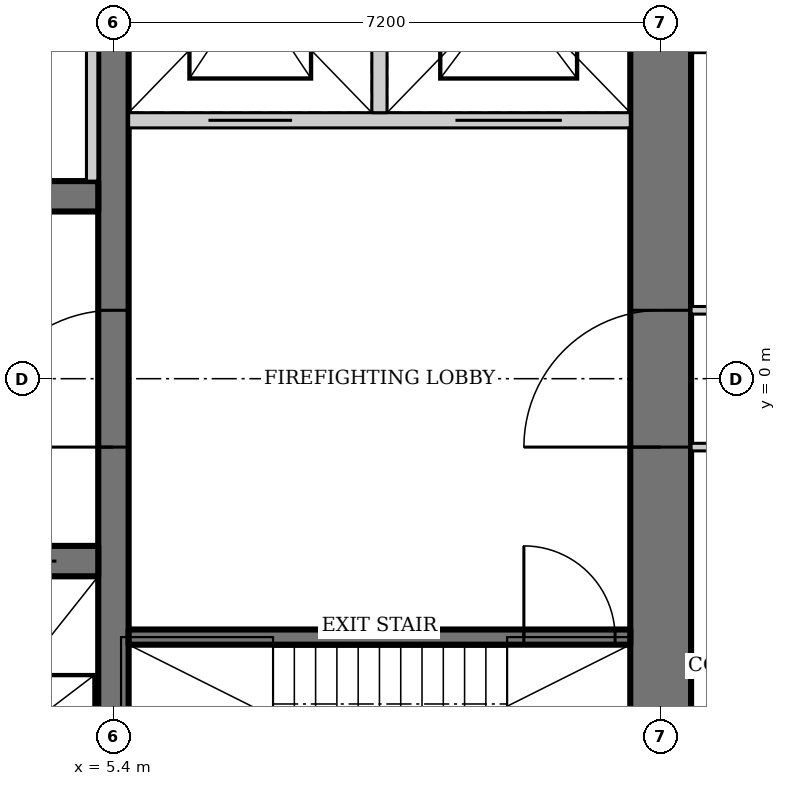
"""IFC4 building model, lengths in metres.
Left out: names, types, materials, properties, quantities, classifications, styles, units other than length and angle.
Written with IfcOpenShell. Run it as: python <this file> out.ifc"""

import sys

from ifc_helpers import new_model, si_unit, direction, frame, frame_2d, origin, place, context, subcontext, project, spatial, rectangle, extrude, element, fill, save


model = new_model("IFC4")
c1 = context("Model", 3, precision=1e-05, world=origin(), true_north=direction((0.0, 1.0)))
c2 = subcontext(c1, "Body", "Model", "MODEL_VIEW")
j1 = project(units=[si_unit("LENGTHUNIT", "METRE"), si_unit("PLANEANGLEUNIT", "RADIAN")], contexts=[c1])
p1 = place(None, origin())
s1 = spatial("IfcSite", under=j1, at=p1, CompositionType="ELEMENT")
p2 = place(p1, origin())
s2 = spatial("IfcBuilding", under=s1, at=p2, CompositionType="ELEMENT")
p3 = place(p2, frame((0.0, 0.0, 253.6)))
s3 = spatial("IfcBuildingStorey", under=s2, at=p3, CompositionType="ELEMENT", Elevation=253.6)
p4 = place(p3, frame((12.6, -11.0, 0.0), z_axis=(0.0, 0.0, 1.0), x_axis=(0.0, 1.0, 0.0)))
e1 = element("IfcWall", 1, at=p4, inside=s3, PredefinedType="SHEAR", context=c2, shape_type="SweptSolid", body=[
    extrude(rectangle(XDim=22.0, YDim=0.8, at=frame_2d((11.0, 0.0))), origin(), (0.0, 0.0, 1.0), 4.2),
])
p5 = place(p4, frame((10.1, 0.0, 0.0)))
e2 = element("IfcOpeningElement", 2, at=p5, cuts=e1, PredefinedType="OPENING", context=c2, shape_type="SweptSolid", body=[
    extrude(rectangle(XDim=1.8, YDim=2.1, at=frame_2d((0.9, 1.05))), frame((0.0, 0.41, 0.0), z_axis=(0.0, -1.0, 0.0), x_axis=(1.0, 0.0, 0.0)), (0.0, 0.0, 1.0), 0.82),
])
p6 = place(p3, frame((5.4, -6.8, 0.0), z_axis=(0.0, 0.0, 1.0), x_axis=(0.0, 1.0, 0.0)))
e3 = element("IfcWall", 3, at=p6, inside=s3, PredefinedType="SHEAR", context=c2, shape_type="SweptSolid", body=[
    extrude(rectangle(XDim=14.6, YDim=0.4, at=frame_2d((7.3, 0.0))), origin(), (0.0, 0.0, 1.0), 4.2),
])
p7 = place(p6, frame((5.9, 0.0, 0.0)))
e4 = element("IfcOpeningElement", 4, at=p7, cuts=e3, PredefinedType="OPENING", context=c2, shape_type="SweptSolid", body=[
    extrude(rectangle(XDim=1.8, YDim=2.1, at=frame_2d((0.9, 1.05))), frame((0.0, 0.21, 0.0), z_axis=(0.0, -1.0, 0.0), x_axis=(1.0, 0.0, 0.0)), (0.0, 0.0, 1.0), 0.42),
])
p8 = place(p3, frame((-5.2, -2.4, 0.0), z_axis=(0.0, 0.0, 1.0), x_axis=(1.0, 0.0, 0.0)))
e5 = element("IfcWall", 5, at=p8, inside=s3, PredefinedType="SHEAR", context=c2, shape_type="SweptSolid", body=[
    extrude(rectangle(XDim=10.4, YDim=0.4, at=frame_2d((5.2, 0.0))), origin(), (0.0, 0.0, 1.0), 4.2),
])
p9 = place(p8, frame((1.683, 0.0, 0.0)))
e6 = element("IfcOpeningElement", 6, at=p9, cuts=e5, PredefinedType="OPENING", context=c2, shape_type="SweptSolid", body=[
    extrude(rectangle(XDim=1.1, YDim=2.2, at=frame_2d((0.55, 1.1))), frame((0.0, 0.21, 0.0), z_axis=(0.0, -1.0, 0.0), x_axis=(1.0, 0.0, 0.0)), (0.0, 0.0, 1.0), 0.42),
])
p10 = place(p8, frame((5.217, 0.0, 0.0)))
e7 = element("IfcOpeningElement", 7, at=p10, cuts=e5, PredefinedType="OPENING", context=c2, shape_type="SweptSolid", body=[
    extrude(rectangle(XDim=1.1, YDim=2.2, at=frame_2d((0.55, 1.1))), frame((0.0, 0.21, 0.0), z_axis=(0.0, -1.0, 0.0), x_axis=(1.0, 0.0, 0.0)), (0.0, 0.0, 1.0), 0.42),
])
p11 = place(p8, frame((8.75, 0.0, 0.0)))
e8 = element("IfcOpeningElement", 8, at=p11, cuts=e5, PredefinedType="OPENING", context=c2, shape_type="SweptSolid", body=[
    extrude(rectangle(XDim=1.1, YDim=2.2, at=frame_2d((0.55, 1.1))), frame((0.0, 0.21, 0.0), z_axis=(0.0, -1.0, 0.0), x_axis=(1.0, 0.0, 0.0)), (0.0, 0.0, 1.0), 0.42),
])
p12 = place(p3, frame((5.2, 2.4, 0.0), z_axis=(0.0, 0.0, 1.0), x_axis=(-1.0, 0.0, 0.0)))
e9 = element("IfcWall", 9, at=p12, inside=s3, PredefinedType="SHEAR", context=c2, shape_type="SweptSolid", body=[
    extrude(rectangle(XDim=10.4, YDim=0.4, at=frame_2d((5.2, 0.0))), origin(), (0.0, 0.0, 1.0), 4.2),
])
p13 = place(p3, frame((5.6, -3.4, 0.0), z_axis=(0.0, 0.0, 1.0), x_axis=(1.0, 0.0, 0.0)))
e10 = element("IfcWall", 10, at=p13, inside=s3, PredefinedType="SHEAR", context=c2, shape_type="SweptSolid", body=[
    extrude(rectangle(XDim=6.6, YDim=0.2, at=frame_2d((3.3, 0.0))), origin(), (0.0, 0.0, 1.0), 4.2),
])
p14 = place(p13, frame((5.2, 0.0, 0.0)))
e11 = element("IfcOpeningElement", 11, at=p14, cuts=e10, PredefinedType="OPENING", context=c2, shape_type="SweptSolid", body=[
    extrude(rectangle(XDim=1.2, YDim=2.1, at=frame_2d((0.6, 1.05))), frame((0.0, 0.11, 0.0), z_axis=(0.0, -1.0, 0.0), x_axis=(1.0, 0.0, 0.0)), (0.0, 0.0, 1.0), 0.22),
])
p15 = place(p3, frame((12.2, 3.4, 0.0), z_axis=(0.0, 0.0, 1.0), x_axis=(-1.0, 0.0, 0.0)))
e12 = element("IfcWall", 12, at=p15, inside=s3, PredefinedType="SOLIDWALL", context=c2, shape_type="SweptSolid", body=[
    extrude(rectangle(XDim=6.6, YDim=0.2, at=frame_2d((3.3, 0.0))), origin(), (0.0, 0.0, 1.0), 4.2),
])
p16 = place(p15, frame((4.45, 0.0, 0.0)))
e13 = element("IfcOpeningElement", 13, at=p16, cuts=e12, PredefinedType="OPENING", context=c2, shape_type="SweptSolid", body=[
    extrude(rectangle(XDim=1.1, YDim=2.2, at=frame_2d((0.55, 1.1))), frame((0.0, 0.11, 0.0), z_axis=(0.0, -1.0, 0.0), x_axis=(1.0, 0.0, 0.0)), (0.0, 0.0, 1.0), 0.22),
])
p17 = place(p15, frame((0.9, 0.0, 0.0)))
e14 = element("IfcOpeningElement", 14, at=p17, cuts=e12, PredefinedType="OPENING", context=c2, shape_type="SweptSolid", body=[
    extrude(rectangle(XDim=1.4, YDim=2.2, at=frame_2d((0.7, 1.1))), frame((0.0, 0.11, 0.0), z_axis=(0.0, -1.0, 0.0), x_axis=(1.0, 0.0, 0.0)), (0.0, 0.0, 1.0), 0.22),
])
p18 = place(p3, frame((8.9, 3.5, 0.0), z_axis=(0.0, 0.0, 1.0), x_axis=(0.0, 1.0, 0.0)))
e15 = element("IfcWall", 15, at=p18, inside=s3, PredefinedType="SOLIDWALL", context=c2, shape_type="SweptSolid", body=[
    extrude(rectangle(XDim=3.3, YDim=0.2, at=frame_2d((1.65, 0.0))), origin(), (0.0, 0.0, 1.0), 4.2),
])
p19 = place(p3, frame((5.12, 2.6, 0.0), z_axis=(0.0, 0.0, 1.0), x_axis=(0.0, 1.0, 0.0)))
e16 = element("IfcWall", 16, at=p19, inside=s3, PredefinedType="SOLIDWALL", context=c2, shape_type="SweptSolid", body=[
    extrude(rectangle(XDim=4.4, YDim=0.15, at=frame_2d((2.2, 0.0))), origin(), (0.0, 0.0, 1.0), 4.05),
])
p20 = place(p3, frame((13.0, 4.34, 0.0), z_axis=(0.0, 0.0, 1.0), x_axis=(1.0, 0.0, 0.0)))
e17 = element("IfcWall", 17, at=p20, inside=s3, PredefinedType="PARTITIONING", context=c2, shape_type="SweptSolid", body=[
    extrude(rectangle(XDim=3.729, YDim=0.1, at=frame_2d((1.865, 0.0))), origin(), (0.0, 0.0, 1.0), 4.05),
])
p21 = place(p3, frame((13.0, -0.9, 0.0), z_axis=(0.0, 0.0, 1.0), x_axis=(1.0, 0.0, 0.0)))
e18 = element("IfcWall", 18, at=p21, inside=s3, PredefinedType="PARTITIONING", context=c2, shape_type="SweptSolid", body=[
    extrude(rectangle(XDim=2.165, YDim=0.1, at=frame_2d((1.083, 0.0))), origin(), (0.0, 0.0, 1.0), 4.05),
])
p22 = place(p21, frame((1.15, 0.0, 0.0)))
e19 = element("IfcOpeningElement", 19, at=p22, cuts=e18, PredefinedType="OPENING", context=c2, shape_type="SweptSolid", body=[
    extrude(rectangle(XDim=0.9, YDim=2.1, at=frame_2d((0.45, 1.05))), frame((0.0, 0.06, 0.0), z_axis=(0.0, -1.0, 0.0), x_axis=(1.0, 0.0, 0.0)), (0.0, 0.0, 1.0), 0.12),
])
p23 = place(p3, frame((15.165, 0.9, 0.0), z_axis=(0.0, 0.0, 1.0), x_axis=(-1.0, 0.0, 0.0)))
e20 = element("IfcWall", 20, at=p23, inside=s3, PredefinedType="PARTITIONING", context=c2, shape_type="SweptSolid", body=[
    extrude(rectangle(XDim=2.165, YDim=0.1, at=frame_2d((1.083, 0.0))), origin(), (0.0, 0.0, 1.0), 4.05),
])
p24 = place(p23, frame((0.1, 0.0, 0.0)))
e21 = element("IfcOpeningElement", 21, at=p24, cuts=e20, PredefinedType="OPENING", context=c2, shape_type="SweptSolid", body=[
    extrude(rectangle(XDim=0.9, YDim=2.1, at=frame_2d((0.45, 1.05))), frame((0.0, 0.06, 0.0), z_axis=(0.0, -1.0, 0.0), x_axis=(1.0, 0.0, 0.0)), (0.0, 0.0, 1.0), 0.12),
])
p25 = place(p7, origin())
e22 = element("IfcDoor", 22, at=p25, inside=s3, OperationType="DOUBLE_DOOR_DOUBLE_SWING", PredefinedType="DOOR", context=c2, shape_type="SweptSolid", body=[
    extrude(rectangle(XDim=1.8, YDim=2.1, at=frame_2d((0.9, 1.05))), frame((0.0, 0.025, 0.0), z_axis=(0.0, -1.0, 0.0), x_axis=(1.0, 0.0, 0.0)), (0.0, 0.0, 1.0), 0.05),
])
fill(e4, e22)
p26 = place(p14, origin())
e23 = element("IfcDoor", 23, at=p26, inside=s3, OperationType="SINGLE_SWING_RIGHT", PredefinedType="DOOR", context=c2, shape_type="SweptSolid", body=[
    extrude(rectangle(XDim=1.2, YDim=2.1, at=frame_2d((0.6, 1.05))), frame((0.0, 0.025, 0.0), z_axis=(0.0, -1.0, 0.0), x_axis=(1.0, 0.0, 0.0)), (0.0, 0.0, 1.0), 0.05),
])
fill(e11, e23)
p27 = place(p5, origin())
e24 = element("IfcDoor", 24, at=p27, inside=s3, OperationType="DOUBLE_DOOR_DOUBLE_SWING", PredefinedType="DOOR", context=c2, shape_type="SweptSolid", body=[
    extrude(rectangle(XDim=1.8, YDim=2.1, at=frame_2d((0.9, 1.05))), frame((0.0, 0.025, 0.0), z_axis=(0.0, -1.0, 0.0), x_axis=(1.0, 0.0, 0.0)), (0.0, 0.0, 1.0), 0.05),
])
fill(e2, e24)
p28 = place(p11, origin())
e25 = element("IfcDoor", 25, at=p28, inside=s3, OperationType="DOUBLE_DOOR_SLIDING", PredefinedType="DOOR", context=c2, shape_type="SweptSolid", body=[
    extrude(rectangle(XDim=1.1, YDim=2.2, at=frame_2d((0.55, 1.1))), frame((0.0, 0.025, 0.0), z_axis=(0.0, -1.0, 0.0), x_axis=(1.0, 0.0, 0.0)), (0.0, 0.0, 1.0), 0.05),
])
fill(e8, e25)
p29 = place(p16, origin())
e26 = element("IfcDoor", 26, at=p29, inside=s3, OperationType="DOUBLE_DOOR_SLIDING", PredefinedType="DOOR", context=c2, shape_type="SweptSolid", body=[
    extrude(rectangle(XDim=1.1, YDim=2.2, at=frame_2d((0.55, 1.1))), frame((0.0, 0.025, 0.0), z_axis=(0.0, -1.0, 0.0), x_axis=(1.0, 0.0, 0.0)), (0.0, 0.0, 1.0), 0.05),
])
fill(e13, e26)
p30 = place(p17, origin())
e27 = element("IfcDoor", 27, at=p30, inside=s3, OperationType="DOUBLE_DOOR_SLIDING", PredefinedType="DOOR", context=c2, shape_type="SweptSolid", body=[
    extrude(rectangle(XDim=1.4, YDim=2.2, at=frame_2d((0.7, 1.1))), frame((0.0, 0.025, 0.0), z_axis=(0.0, -1.0, 0.0), x_axis=(1.0, 0.0, 0.0)), (0.0, 0.0, 1.0), 0.05),
])
fill(e14, e27)
save(model, sys.argv[1])
